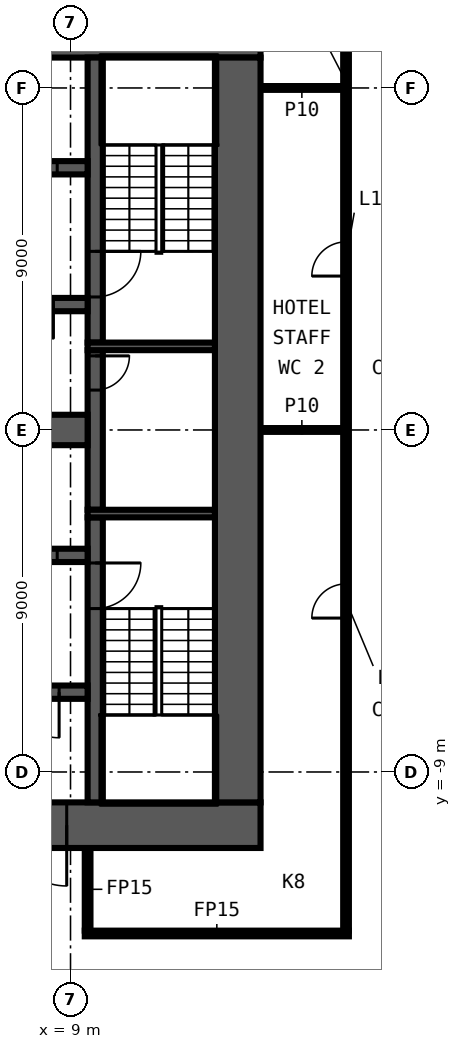
"""IFC4 building model, lengths in metres.
Left out: names, types, materials, properties, quantities, classifications, styles, units other than length and angle.
Written with IfcOpenShell. Run it as: python <this file> out.ifc"""

import sys

from ifc_helpers import new_model, si_unit, direction, frame, frame_2d, origin, place, context, subcontext, project, spatial, rectangle, extrude, element, fill, save


model = new_model("IFC4")
c1 = context("Model", 3, precision=1e-05, world=origin(), true_north=direction((0.0, 1.0)))
c2 = subcontext(c1, "Body", "Model", "MODEL_VIEW")
j1 = project(units=[si_unit("LENGTHUNIT", "METRE"), si_unit("PLANEANGLEUNIT", "RADIAN")], contexts=[c1])
p1 = place(None, origin())
s1 = spatial("IfcSite", under=j1, at=p1, CompositionType="ELEMENT")
p2 = place(p1, origin())
s2 = spatial("IfcBuilding", under=s1, at=p2, CompositionType="ELEMENT")
p3 = place(p2, frame((0.0, 0.0, 73.6)))
s3 = spatial("IfcBuildingStorey", under=s2, at=p3, CompositionType="ELEMENT", Elevation=73.6)
p4 = place(p3, frame((9.375, -13.25, 0.0), z_axis=(0.0, 0.0, 1.0), x_axis=(1.0, 0.0, 0.0)))
e1 = element("IfcWall", 1, at=p4, inside=s3, PredefinedType="PARTITIONING", context=c2, shape_type="SweptSolid", body=[
    extrude(rectangle(XDim=6.95, YDim=0.15, at=frame_2d((3.475, 0.0))), origin(), (0.0, 0.0, 1.0), 3.3),
])
for number, where, z_axis, x_axis in (
    (2, (14.0, 0.0, 0.0), (0.0, 0.0, 1.0), (1.0, 0.0, 0.0)),
    (3, (14.0, 9.0, 0.0), (0.0, 0.0, 1.0), (1.0, 0.0, 0.0)),
):
    element("IfcWall", number, at=place(p3, frame(where, z_axis=z_axis, x_axis=x_axis)), inside=s3, PredefinedType="PARTITIONING", context=c2, shape_type="SweptSolid", body=[
        extrude(rectangle(XDim=2.175, YDim=0.1, at=frame_2d((1.087, 0.0))), origin(), (0.0, 0.0, 1.0), 3.3),
    ])
p5 = place(p3, frame((16.25, -13.175, 0.0), z_axis=(0.0, 0.0, 1.0), x_axis=(0.0, 1.0, 0.0)))
e4 = element("IfcWall", 4, at=p5, inside=s3, PredefinedType="PARTITIONING", context=c2, shape_type="SweptSolid", body=[
    extrude(rectangle(XDim=26.35, YDim=0.15, at=frame_2d((13.175, 0.0))), origin(), (0.0, 0.0, 1.0), 3.3),
])
p6 = place(p5, frame((8.225, 0.0, 0.0)))
e5 = element("IfcOpeningElement", 5, at=p6, cuts=e4, PredefinedType="OPENING", context=c2, shape_type="SweptSolid", body=[
    extrude(rectangle(XDim=0.9, YDim=2.1, at=frame_2d((0.45, 1.05))), frame((0.0, 0.085, 0.0), z_axis=(0.0, -1.0, 0.0), x_axis=(1.0, 0.0, 0.0)), (0.0, 0.0, 1.0), 0.17),
])
p7 = place(p5, frame((17.225, 0.0, 0.0)))
e6 = element("IfcOpeningElement", 6, at=p7, cuts=e4, PredefinedType="OPENING", context=c2, shape_type="SweptSolid", body=[
    extrude(rectangle(XDim=0.9, YDim=2.1, at=frame_2d((0.45, 1.05))), frame((0.0, 0.085, 0.0), z_axis=(0.0, -1.0, 0.0), x_axis=(1.0, 0.0, 0.0)), (0.0, 0.0, 1.0), 0.17),
])
p8 = place(p3, frame((9.45, -13.175, 0.0), z_axis=(0.0, 0.0, 1.0), x_axis=(0.0, 1.0, 0.0)))
e7 = element("IfcWall", 7, at=p8, inside=s3, PredefinedType="PARTITIONING", context=c2, shape_type="SweptSolid", body=[
    extrude(rectangle(XDim=2.175, YDim=0.15, at=frame_2d((1.087, 0.0))), origin(), (0.0, 0.0, 1.0), 3.3),
])
p9 = place(p3, frame((-14.0, 10.4, 0.0), z_axis=(0.0, 0.0, 1.0), x_axis=(1.0, 0.0, 0.0)))
e8 = element("IfcWall", 8, at=p9, inside=s3, PredefinedType="SHEAR", context=c2, shape_type="SweptSolid", body=[
    extrude(rectangle(XDim=28.0, YDim=1.2, at=frame_2d((14.0, 0.0))), origin(), (0.0, 0.0, 1.0), 3.3),
])
p10 = place(p9, frame((15.9, 0.0, 0.0)))
e9 = element("IfcOpeningElement", 9, at=p10, cuts=e8, PredefinedType="OPENING", context=c2, shape_type="SweptSolid", body=[
    extrude(rectangle(XDim=1.6, YDim=2.1, at=frame_2d((0.8, 1.05))), frame((0.0, 0.61, 0.0), z_axis=(0.0, -1.0, 0.0), x_axis=(1.0, 0.0, 0.0)), (0.0, 0.0, 1.0), 1.22),
])
p11 = place(p3, frame((14.0, -10.4, 0.0), z_axis=(0.0, 0.0, 1.0), x_axis=(-1.0, 0.0, 0.0)))
e10 = element("IfcWall", 10, at=p11, inside=s3, PredefinedType="SHEAR", context=c2, shape_type="SweptSolid", body=[
    extrude(rectangle(XDim=28.0, YDim=1.2, at=frame_2d((14.0, 0.0))), origin(), (0.0, 0.0, 1.0), 3.3),
])
p12 = place(p11, frame((5.1, 0.0, 0.0)))
e11 = element("IfcOpeningElement", 11, at=p12, cuts=e10, PredefinedType="OPENING", context=c2, shape_type="SweptSolid", body=[
    extrude(rectangle(XDim=1.6, YDim=2.1, at=frame_2d((0.8, 1.05))), frame((0.0, 0.61, 0.0), z_axis=(0.0, -1.0, 0.0), x_axis=(1.0, 0.0, 0.0)), (0.0, 0.0, 1.0), 1.22),
])
p13 = place(p3, frame((13.4, 9.8, 0.0), z_axis=(0.0, 0.0, 1.0), x_axis=(0.0, -1.0, 0.0)))
e12 = element("IfcWall", 12, at=p13, inside=s3, PredefinedType="SHEAR", context=c2, shape_type="SweptSolid", body=[
    extrude(rectangle(XDim=19.6, YDim=1.2, at=frame_2d((9.8, 0.0))), origin(), (0.0, 0.0, 1.0), 3.3),
])
p14 = place(p3, frame((9.65, -2.3, 0.0), z_axis=(0.0, 0.0, 1.0), x_axis=(0.0, -1.0, 0.0)))
e13 = element("IfcWall", 13, at=p14, inside=s3, PredefinedType="SHEAR", context=c2, shape_type="SweptSolid", body=[
    extrude(rectangle(XDim=7.5, YDim=0.4, at=frame_2d((3.75, 0.0))), origin(), (0.0, 0.0, 1.0), 3.3),
])
p15 = place(p14, frame((1.2, 0.0, 0.0)))
e14 = element("IfcOpeningElement", 14, at=p15, cuts=e13, PredefinedType="OPENING", context=c2, shape_type="SweptSolid", body=[
    extrude(rectangle(XDim=1.2, YDim=2.1, at=frame_2d((0.6, 1.05))), frame((0.0, 0.21, 0.0), z_axis=(0.0, -1.0, 0.0), x_axis=(1.0, 0.0, 0.0)), (0.0, 0.0, 1.0), 0.42),
])
p16 = place(p3, frame((9.65, 2.1, 0.0), z_axis=(0.0, 0.0, 1.0), x_axis=(0.0, -1.0, 0.0)))
e15 = element("IfcWall", 15, at=p16, inside=s3, PredefinedType="SHEAR", context=c2, shape_type="SweptSolid", body=[
    extrude(rectangle(XDim=4.2, YDim=0.4, at=frame_2d((2.1, 0.0))), origin(), (0.0, 0.0, 1.0), 3.3),
])
p17 = place(p16, frame((0.15, 0.0, 0.0)))
e16 = element("IfcOpeningElement", 16, at=p17, cuts=e15, PredefinedType="OPENING", context=c2, shape_type="SweptSolid", body=[
    extrude(rectangle(XDim=0.9, YDim=2.1, at=frame_2d((0.45, 1.05))), frame((0.0, 0.21, 0.0), z_axis=(0.0, -1.0, 0.0), x_axis=(1.0, 0.0, 0.0)), (0.0, 0.0, 1.0), 0.42),
])
p18 = place(p3, frame((9.65, 9.8, 0.0), z_axis=(0.0, 0.0, 1.0), x_axis=(0.0, -1.0, 0.0)))
e17 = element("IfcWall", 17, at=p18, inside=s3, PredefinedType="SHEAR", context=c2, shape_type="SweptSolid", body=[
    extrude(rectangle(XDim=7.5, YDim=0.4, at=frame_2d((3.75, 0.0))), origin(), (0.0, 0.0, 1.0), 3.3),
])
p19 = place(p18, frame((5.1, 0.0, 0.0)))
e18 = element("IfcOpeningElement", 18, at=p19, cuts=e17, PredefinedType="OPENING", context=c2, shape_type="SweptSolid", body=[
    extrude(rectangle(XDim=1.2, YDim=2.1, at=frame_2d((0.6, 1.05))), frame((0.0, 0.21, 0.0), z_axis=(0.0, -1.0, 0.0), x_axis=(1.0, 0.0, 0.0)), (0.0, 0.0, 1.0), 0.42),
])
for number, where, z_axis, x_axis in (
    (19, (9.45, 2.2, 0.0), (0.0, 0.0, 1.0), (1.0, 0.0, 0.0)),
    (20, (9.45, -2.2, 0.0), (0.0, 0.0, 1.0), (1.0, 0.0, 0.0)),
):
    element("IfcWall", number, at=place(p3, frame(where, z_axis=z_axis, x_axis=x_axis)), inside=s3, PredefinedType="SHEAR", context=c2, shape_type="SweptSolid", body=[
        extrude(rectangle(XDim=3.35, YDim=0.2, at=frame_2d((1.675, 0.0))), origin(), (0.0, 0.0, 1.0), 3.3),
    ])
p20 = place(p3, frame((-9.45, 6.9, 0.0), z_axis=(0.0, 0.0, 1.0), x_axis=(1.0, 0.0, 0.0)))
e21 = element("IfcWall", 21, at=p20, inside=s3, PredefinedType="SHEAR", context=c2, shape_type="SweptSolid", body=[
    extrude(rectangle(XDim=18.9, YDim=0.35, at=frame_2d((9.45, 0.0))), origin(), (0.0, 0.0, 1.0), 3.3),
])
p21 = place(p20, frame((0.8, 0.0, 0.0)))
e22 = element("IfcOpeningElement", 22, at=p21, cuts=e21, PredefinedType="OPENING", context=c2, shape_type="SweptSolid", body=[
    extrude(rectangle(XDim=1.1, YDim=2.1, at=frame_2d((0.55, 1.05))), frame((0.0, 0.185, 0.0), z_axis=(0.0, -1.0, 0.0), x_axis=(1.0, 0.0, 0.0)), (0.0, 0.0, 1.0), 0.37),
])
p22 = place(p20, frame((3.5, 0.0, 0.0)))
e23 = element("IfcOpeningElement", 23, at=p22, cuts=e21, PredefinedType="OPENING", context=c2, shape_type="SweptSolid", body=[
    extrude(rectangle(XDim=1.1, YDim=2.1, at=frame_2d((0.55, 1.05))), frame((0.0, 0.185, 0.0), z_axis=(0.0, -1.0, 0.0), x_axis=(1.0, 0.0, 0.0)), (0.0, 0.0, 1.0), 0.37),
])
p23 = place(p20, frame((6.2, 0.0, 0.0)))
e24 = element("IfcOpeningElement", 24, at=p23, cuts=e21, PredefinedType="OPENING", context=c2, shape_type="SweptSolid", body=[
    extrude(rectangle(XDim=1.1, YDim=2.1, at=frame_2d((0.55, 1.05))), frame((0.0, 0.185, 0.0), z_axis=(0.0, -1.0, 0.0), x_axis=(1.0, 0.0, 0.0)), (0.0, 0.0, 1.0), 0.37),
])
p24 = place(p20, frame((8.9, 0.0, 0.0)))
e25 = element("IfcOpeningElement", 25, at=p24, cuts=e21, PredefinedType="OPENING", context=c2, shape_type="SweptSolid", body=[
    extrude(rectangle(XDim=1.1, YDim=2.1, at=frame_2d((0.55, 1.05))), frame((0.0, 0.185, 0.0), z_axis=(0.0, -1.0, 0.0), x_axis=(1.0, 0.0, 0.0)), (0.0, 0.0, 1.0), 0.37),
])
p25 = place(p20, frame((11.55, 0.0, 0.0)))
e26 = element("IfcOpeningElement", 26, at=p25, cuts=e21, PredefinedType="OPENING", context=c2, shape_type="SweptSolid", body=[
    extrude(rectangle(XDim=1.2, YDim=2.1, at=frame_2d((0.6, 1.05))), frame((0.0, 0.185, 0.0), z_axis=(0.0, -1.0, 0.0), x_axis=(1.0, 0.0, 0.0)), (0.0, 0.0, 1.0), 0.37),
])
p26 = place(p20, frame((14.3, 0.0, 0.0)))
e27 = element("IfcOpeningElement", 27, at=p26, cuts=e21, PredefinedType="OPENING", context=c2, shape_type="SweptSolid", body=[
    extrude(rectangle(XDim=1.1, YDim=2.1, at=frame_2d((0.55, 1.05))), frame((0.0, 0.185, 0.0), z_axis=(0.0, -1.0, 0.0), x_axis=(1.0, 0.0, 0.0)), (0.0, 0.0, 1.0), 0.37),
])
p27 = place(p20, frame((17.0, 0.0, 0.0)))
e28 = element("IfcOpeningElement", 28, at=p27, cuts=e21, PredefinedType="OPENING", context=c2, shape_type="SweptSolid", body=[
    extrude(rectangle(XDim=1.1, YDim=2.1, at=frame_2d((0.55, 1.05))), frame((0.0, 0.185, 0.0), z_axis=(0.0, -1.0, 0.0), x_axis=(1.0, 0.0, 0.0)), (0.0, 0.0, 1.0), 0.37),
])
p28 = place(p3, frame((9.45, 3.3, 0.0), z_axis=(0.0, 0.0, 1.0), x_axis=(-1.0, 0.0, 0.0)))
e29 = element("IfcWall", 29, at=p28, inside=s3, PredefinedType="SHEAR", context=c2, shape_type="SweptSolid", body=[
    extrude(rectangle(XDim=18.9, YDim=0.35, at=frame_2d((9.45, 0.0))), origin(), (0.0, 0.0, 1.0), 3.3),
])
p29 = place(p28, frame((17.0, 0.0, 0.0)))
e30 = element("IfcOpeningElement", 30, at=p29, cuts=e29, PredefinedType="OPENING", context=c2, shape_type="SweptSolid", body=[
    extrude(rectangle(XDim=1.1, YDim=2.1, at=frame_2d((0.55, 1.05))), frame((0.0, 0.185, 0.0), z_axis=(0.0, -1.0, 0.0), x_axis=(1.0, 0.0, 0.0)), (0.0, 0.0, 1.0), 0.37),
])
p30 = place(p28, frame((14.3, 0.0, 0.0)))
e31 = element("IfcOpeningElement", 31, at=p30, cuts=e29, PredefinedType="OPENING", context=c2, shape_type="SweptSolid", body=[
    extrude(rectangle(XDim=1.1, YDim=2.1, at=frame_2d((0.55, 1.05))), frame((0.0, 0.185, 0.0), z_axis=(0.0, -1.0, 0.0), x_axis=(1.0, 0.0, 0.0)), (0.0, 0.0, 1.0), 0.37),
])
p31 = place(p28, frame((11.6, 0.0, 0.0)))
e32 = element("IfcOpeningElement", 32, at=p31, cuts=e29, PredefinedType="OPENING", context=c2, shape_type="SweptSolid", body=[
    extrude(rectangle(XDim=1.1, YDim=2.1, at=frame_2d((0.55, 1.05))), frame((0.0, 0.185, 0.0), z_axis=(0.0, -1.0, 0.0), x_axis=(1.0, 0.0, 0.0)), (0.0, 0.0, 1.0), 0.37),
])
p32 = place(p28, frame((8.9, 0.0, 0.0)))
e33 = element("IfcOpeningElement", 33, at=p32, cuts=e29, PredefinedType="OPENING", context=c2, shape_type="SweptSolid", body=[
    extrude(rectangle(XDim=1.1, YDim=2.1, at=frame_2d((0.55, 1.05))), frame((0.0, 0.185, 0.0), z_axis=(0.0, -1.0, 0.0), x_axis=(1.0, 0.0, 0.0)), (0.0, 0.0, 1.0), 0.37),
])
p33 = place(p28, frame((6.2, 0.0, 0.0)))
e34 = element("IfcOpeningElement", 34, at=p33, cuts=e29, PredefinedType="OPENING", context=c2, shape_type="SweptSolid", body=[
    extrude(rectangle(XDim=1.1, YDim=2.1, at=frame_2d((0.55, 1.05))), frame((0.0, 0.185, 0.0), z_axis=(0.0, -1.0, 0.0), x_axis=(1.0, 0.0, 0.0)), (0.0, 0.0, 1.0), 0.37),
])
p34 = place(p28, frame((3.5, 0.0, 0.0)))
e35 = element("IfcOpeningElement", 35, at=p34, cuts=e29, PredefinedType="OPENING", context=c2, shape_type="SweptSolid", body=[
    extrude(rectangle(XDim=1.1, YDim=2.1, at=frame_2d((0.55, 1.05))), frame((0.0, 0.185, 0.0), z_axis=(0.0, -1.0, 0.0), x_axis=(1.0, 0.0, 0.0)), (0.0, 0.0, 1.0), 0.37),
])
p35 = place(p28, frame((0.9, 0.0, 0.0)))
e36 = element("IfcOpeningElement", 36, at=p35, cuts=e29, PredefinedType="OPENING", context=c2, shape_type="SweptSolid", body=[
    extrude(rectangle(XDim=0.9, YDim=2.1, at=frame_2d((0.45, 1.05))), frame((0.0, 0.185, 0.0), z_axis=(0.0, -1.0, 0.0), x_axis=(1.0, 0.0, 0.0)), (0.0, 0.0, 1.0), 0.37),
])
p36 = place(p3, frame((-9.45, -3.3, 0.0), z_axis=(0.0, 0.0, 1.0), x_axis=(1.0, 0.0, 0.0)))
e37 = element("IfcWall", 37, at=p36, inside=s3, PredefinedType="SHEAR", context=c2, shape_type="SweptSolid", body=[
    extrude(rectangle(XDim=18.9, YDim=0.35, at=frame_2d((9.45, 0.0))), origin(), (0.0, 0.0, 1.0), 3.3),
])
p37 = place(p36, frame((17.0, 0.0, 0.0)))
e38 = element("IfcOpeningElement", 38, at=p37, cuts=e37, PredefinedType="OPENING", context=c2, shape_type="SweptSolid", body=[
    extrude(rectangle(XDim=1.1, YDim=2.1, at=frame_2d((0.55, 1.05))), frame((0.0, 0.185, 0.0), z_axis=(0.0, -1.0, 0.0), x_axis=(1.0, 0.0, 0.0)), (0.0, 0.0, 1.0), 0.37),
])
p38 = place(p36, frame((0.9, 0.0, 0.0)))
e39 = element("IfcOpeningElement", 39, at=p38, cuts=e37, PredefinedType="OPENING", context=c2, shape_type="SweptSolid", body=[
    extrude(rectangle(XDim=0.9, YDim=2.1, at=frame_2d((0.45, 1.05))), frame((0.0, 0.185, 0.0), z_axis=(0.0, -1.0, 0.0), x_axis=(1.0, 0.0, 0.0)), (0.0, 0.0, 1.0), 0.37),
])
p39 = place(p36, frame((3.6, 0.0, 0.0)))
e40 = element("IfcOpeningElement", 40, at=p39, cuts=e37, PredefinedType="OPENING", context=c2, shape_type="SweptSolid", body=[
    extrude(rectangle(XDim=0.9, YDim=2.1, at=frame_2d((0.45, 1.05))), frame((0.0, 0.185, 0.0), z_axis=(0.0, -1.0, 0.0), x_axis=(1.0, 0.0, 0.0)), (0.0, 0.0, 1.0), 0.37),
])
p40 = place(p36, frame((6.3, 0.0, 0.0)))
e41 = element("IfcOpeningElement", 41, at=p40, cuts=e37, PredefinedType="OPENING", context=c2, shape_type="SweptSolid", body=[
    extrude(rectangle(XDim=0.9, YDim=2.1, at=frame_2d((0.45, 1.05))), frame((0.0, 0.185, 0.0), z_axis=(0.0, -1.0, 0.0), x_axis=(1.0, 0.0, 0.0)), (0.0, 0.0, 1.0), 0.37),
])
p41 = place(p36, frame((9.0, 0.0, 0.0)))
e42 = element("IfcOpeningElement", 42, at=p41, cuts=e37, PredefinedType="OPENING", context=c2, shape_type="SweptSolid", body=[
    extrude(rectangle(XDim=0.9, YDim=2.1, at=frame_2d((0.45, 1.05))), frame((0.0, 0.185, 0.0), z_axis=(0.0, -1.0, 0.0), x_axis=(1.0, 0.0, 0.0)), (0.0, 0.0, 1.0), 0.37),
])
p42 = place(p3, frame((9.45, -6.9, 0.0), z_axis=(0.0, 0.0, 1.0), x_axis=(-1.0, 0.0, 0.0)))
e43 = element("IfcWall", 43, at=p42, inside=s3, PredefinedType="SHEAR", context=c2, shape_type="SweptSolid", body=[
    extrude(rectangle(XDim=18.9, YDim=0.35, at=frame_2d((9.45, 0.0))), origin(), (0.0, 0.0, 1.0), 3.3),
])
p43 = place(p42, frame((0.75, 0.0, 0.0)))
e44 = element("IfcOpeningElement", 44, at=p43, cuts=e43, PredefinedType="OPENING", context=c2, shape_type="SweptSolid", body=[
    extrude(rectangle(XDim=1.2, YDim=2.1, at=frame_2d((0.6, 1.05))), frame((0.0, 0.185, 0.0), z_axis=(0.0, -1.0, 0.0), x_axis=(1.0, 0.0, 0.0)), (0.0, 0.0, 1.0), 0.37),
])
p44 = place(p42, frame((15.75, 0.0, 0.0)))
e45 = element("IfcOpeningElement", 45, at=p44, cuts=e43, PredefinedType="OPENING", context=c2, shape_type="SweptSolid", body=[
    extrude(rectangle(XDim=0.9, YDim=2.1, at=frame_2d((0.45, 1.05))), frame((0.0, 0.185, 0.0), z_axis=(0.0, -1.0, 0.0), x_axis=(1.0, 0.0, 0.0)), (0.0, 0.0, 1.0), 0.37),
])
p45 = place(p42, frame((10.35, 0.0, 0.0)))
e46 = element("IfcOpeningElement", 46, at=p45, cuts=e43, PredefinedType="OPENING", context=c2, shape_type="SweptSolid", body=[
    extrude(rectangle(XDim=0.9, YDim=2.1, at=frame_2d((0.45, 1.05))), frame((0.0, 0.185, 0.0), z_axis=(0.0, -1.0, 0.0), x_axis=(1.0, 0.0, 0.0)), (0.0, 0.0, 1.0), 0.37),
])
p46 = place(p3, frame((-9.45, 0.0, 0.0), z_axis=(0.0, 0.0, 1.0), x_axis=(1.0, 0.0, 0.0)))
e47 = element("IfcWall", 47, at=p46, inside=s3, PredefinedType="SHEAR", context=c2, shape_type="SweptSolid", body=[
    extrude(rectangle(XDim=18.9, YDim=0.8, at=frame_2d((9.45, 0.0))), origin(), (0.0, 0.0, 1.0), 3.3),
])
p47 = place(p6, origin())
e48 = element("IfcDoor", 48, at=p47, inside=s3, OperationType="SINGLE_SWING_LEFT", PredefinedType="DOOR", context=c2, shape_type="SweptSolid", body=[
    extrude(rectangle(XDim=0.9, YDim=2.1, at=frame_2d((0.45, 1.05))), frame((0.0, 0.025, 0.0), z_axis=(0.0, -1.0, 0.0), x_axis=(1.0, 0.0, 0.0)), (0.0, 0.0, 1.0), 0.05),
])
fill(e5, e48)
p48 = place(p7, origin())
e49 = element("IfcDoor", 49, at=p48, inside=s3, OperationType="SINGLE_SWING_RIGHT", PredefinedType="DOOR", context=c2, shape_type="SweptSolid", body=[
    extrude(rectangle(XDim=0.9, YDim=2.1, at=frame_2d((0.45, 1.05))), frame((0.0, 0.025, 0.0), z_axis=(0.0, -1.0, 0.0), x_axis=(1.0, 0.0, 0.0)), (0.0, 0.0, 1.0), 0.05),
])
fill(e6, e49)
p49 = place(p17, origin())
e50 = element("IfcDoor", 50, at=p49, inside=s3, OperationType="SINGLE_SWING_RIGHT", PredefinedType="DOOR", context=c2, shape_type="SweptSolid", body=[
    extrude(rectangle(XDim=0.9, YDim=2.1, at=frame_2d((0.45, 1.05))), frame((0.0, 0.025, 0.0), z_axis=(0.0, -1.0, 0.0), x_axis=(1.0, 0.0, 0.0)), (0.0, 0.0, 1.0), 0.05),
])
fill(e16, e50)
p50 = place(p27, origin())
e51 = element("IfcDoor", 51, at=p50, inside=s3, OperationType="DOUBLE_DOOR_SLIDING", PredefinedType="DOOR", context=c2, shape_type="SweptSolid", body=[
    extrude(rectangle(XDim=1.1, YDim=2.1, at=frame_2d((0.55, 1.05))), frame((0.0, 0.025, 0.0), z_axis=(0.0, -1.0, 0.0), x_axis=(1.0, 0.0, 0.0)), (0.0, 0.0, 1.0), 0.05),
])
fill(e28, e51)
p51 = place(p35, origin())
e52 = element("IfcDoor", 52, at=p51, inside=s3, OperationType="SINGLE_SWING_LEFT", PredefinedType="DOOR", context=c2, shape_type="SweptSolid", body=[
    extrude(rectangle(XDim=0.9, YDim=2.1, at=frame_2d((0.45, 1.05))), frame((0.0, 0.025, 0.0), z_axis=(0.0, -1.0, 0.0), x_axis=(1.0, 0.0, 0.0)), (0.0, 0.0, 1.0), 0.05),
])
fill(e36, e52)
p52 = place(p37, origin())
e53 = element("IfcDoor", 53, at=p52, inside=s3, OperationType="DOUBLE_DOOR_SLIDING", PredefinedType="DOOR", context=c2, shape_type="SweptSolid", body=[
    extrude(rectangle(XDim=1.1, YDim=2.1, at=frame_2d((0.55, 1.05))), frame((0.0, 0.025, 0.0), z_axis=(0.0, -1.0, 0.0), x_axis=(1.0, 0.0, 0.0)), (0.0, 0.0, 1.0), 0.05),
])
fill(e38, e53)
p53 = place(p12, origin())
e54 = element("IfcDoor", 54, at=p53, inside=s3, OperationType="DOUBLE_DOOR_SINGLE_SWING", PredefinedType="DOOR", context=c2, shape_type="SweptSolid", body=[
    extrude(rectangle(XDim=1.6, YDim=2.1, at=frame_2d((0.8, 1.05))), frame((0.0, 0.025, 0.0), z_axis=(0.0, -1.0, 0.0), x_axis=(1.0, 0.0, 0.0)), (0.0, 0.0, 1.0), 0.05),
])
fill(e11, e54)
p54 = place(p43, origin())
e55 = element("IfcDoor", 55, at=p54, inside=s3, OperationType="SINGLE_SWING_LEFT", PredefinedType="DOOR", context=c2, shape_type="SweptSolid", body=[
    extrude(rectangle(XDim=1.2, YDim=2.1, at=frame_2d((0.6, 1.05))), frame((0.0, 0.025, 0.0), z_axis=(0.0, -1.0, 0.0), x_axis=(1.0, 0.0, 0.0)), (0.0, 0.0, 1.0), 0.05),
])
fill(e44, e55)
p55 = place(p19, origin())
e56 = element("IfcDoor", 56, at=p55, inside=s3, OperationType="SINGLE_SWING_LEFT", PredefinedType="DOOR", context=c2, shape_type="SweptSolid", body=[
    extrude(rectangle(XDim=1.2, YDim=2.1, at=frame_2d((0.6, 1.05))), frame((0.0, 0.025, 0.0), z_axis=(0.0, -1.0, 0.0), x_axis=(1.0, 0.0, 0.0)), (0.0, 0.0, 1.0), 0.05),
])
fill(e18, e56)
p56 = place(p15, origin())
e57 = element("IfcDoor", 57, at=p56, inside=s3, OperationType="SINGLE_SWING_RIGHT", PredefinedType="DOOR", context=c2, shape_type="SweptSolid", body=[
    extrude(rectangle(XDim=1.2, YDim=2.1, at=frame_2d((0.6, 1.05))), frame((0.0, 0.025, 0.0), z_axis=(0.0, -1.0, 0.0), x_axis=(1.0, 0.0, 0.0)), (0.0, 0.0, 1.0), 0.05),
])
fill(e14, e57)
save(model, sys.argv[1])
